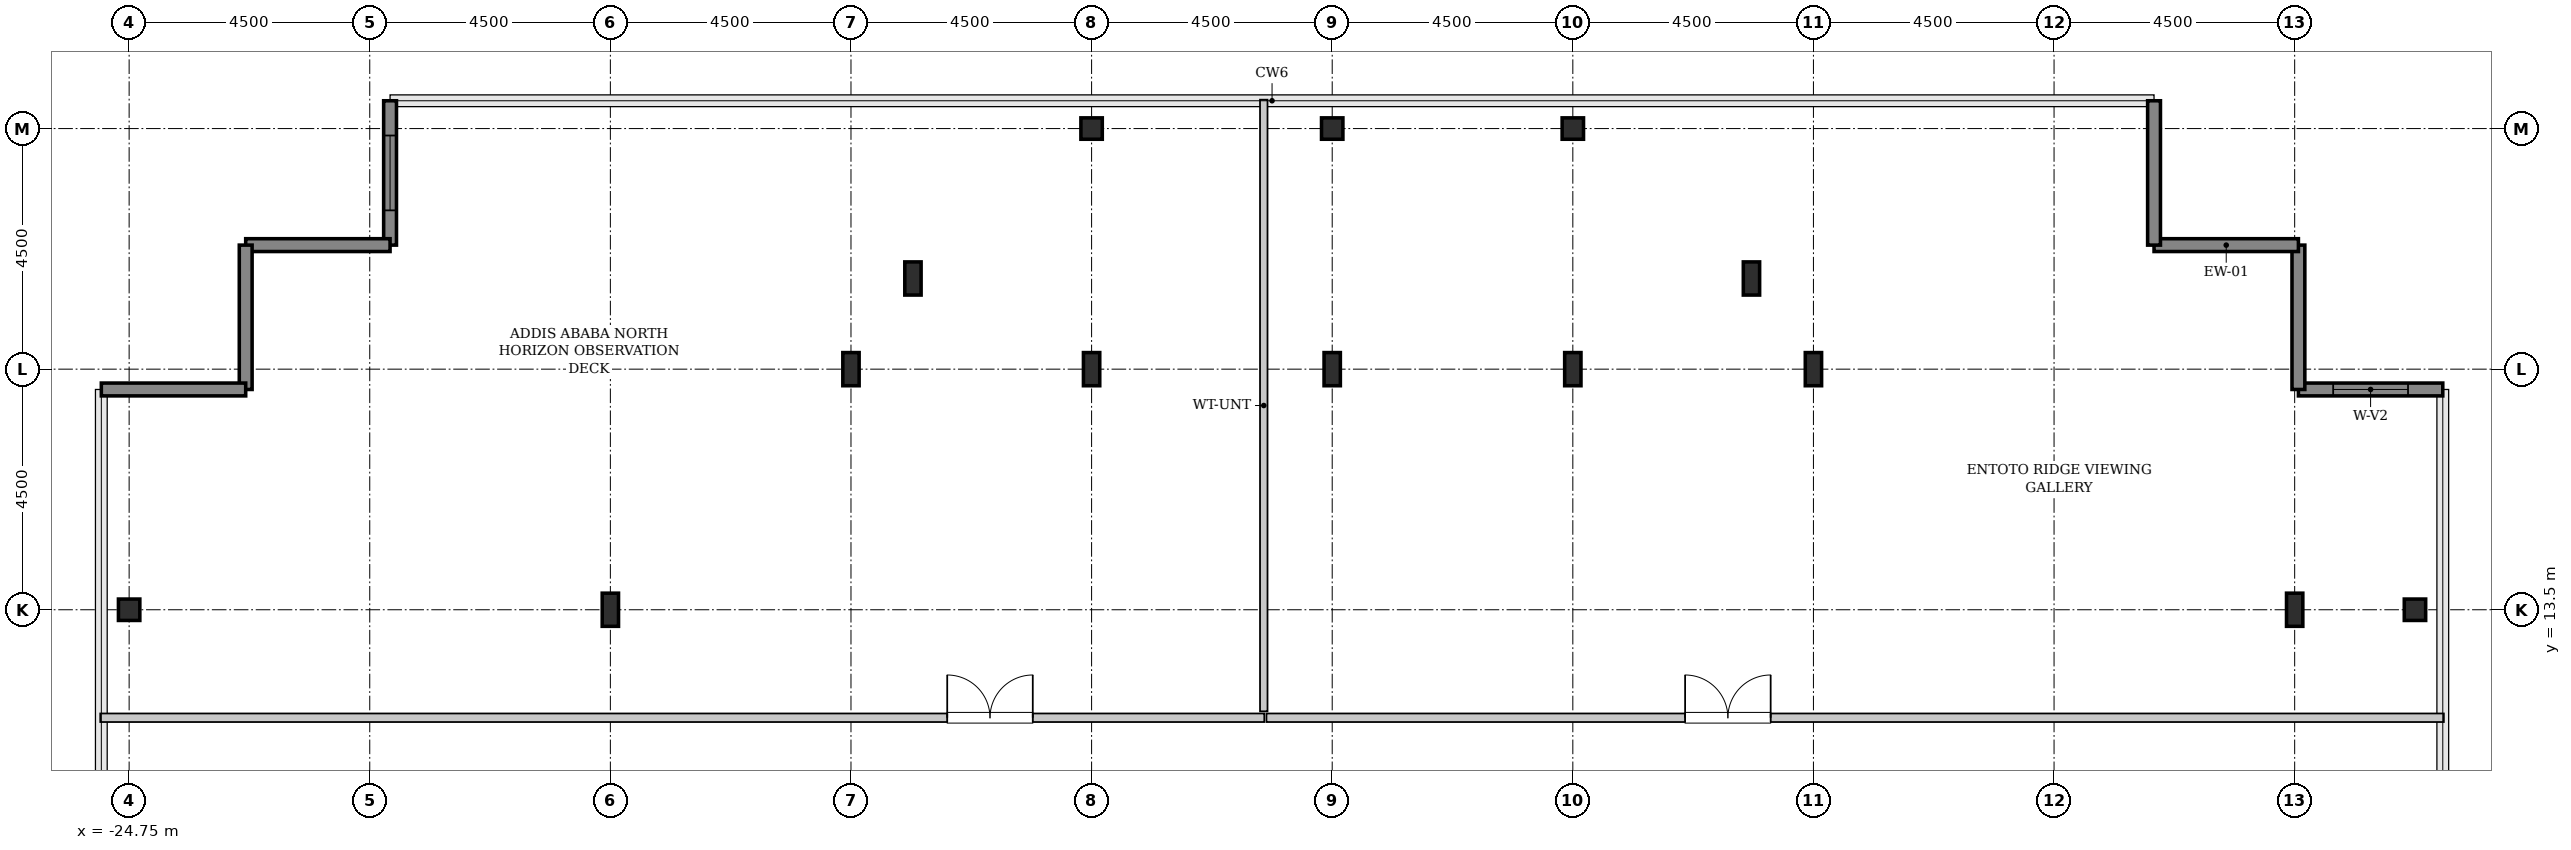
"""IFC4 building model, lengths in metres.
Left out: names, types, materials, properties, quantities, classifications, styles, units other than length and angle.
Written with IfcOpenShell. Run it as: python <this file> out.ifc"""

import sys

from ifc_helpers import new_model, si_unit, direction, frame, frame_2d, origin, origin_2d, place, context, subcontext, project, spatial, rectangle, hollow_rectangle, i_section, extrude, source, transform, mapped, element, fill, save


model = new_model("IFC4")
c1 = context("Model", 3, precision=1e-05, world=origin(), true_north=direction((0.0, 1.0)))
c2 = subcontext(c1, "Body", "Model", "MODEL_VIEW")
j1 = project(units=[si_unit("LENGTHUNIT", "METRE"), si_unit("PLANEANGLEUNIT", "RADIAN")], contexts=[c1])
p1 = place(None, origin())
s1 = spatial("IfcSite", under=j1, at=p1, CompositionType="ELEMENT")
p2 = place(p1, origin())
s2 = spatial("IfcBuilding", under=s1, at=p2, CompositionType="ELEMENT")
p3 = place(p2, frame((0.0, 0.0, 349.0)))
s3 = spatial("IfcBuildingStorey", under=s2, at=p3, CompositionType="ELEMENT", Elevation=349.0)
m1 = source(origin(), c2, "Body", "SweptSolid", [
    extrude(hollow_rectangle(XDim=0.4, YDim=0.4, WallThickness=0.02, InnerFilletRadius=0.02, OuterFilletRadius=0.04, at=origin_2d()), origin(), (0.0, 0.0, 1.0), 4.8),
])
p4 = place(p3, frame((-24.75, 13.5, 0.0), z_axis=(0.0, 0.0, 1.0), x_axis=(1.0, 0.0, 0.0)))
e1 = element("IfcColumn", 1, at=p4, inside=s3, PredefinedType="COLUMN", context=c2, shape_type="MappedRepresentation", body=[
    mapped(m1, transform((0.0, 0.0, 0.0), x_axis=(1.0, 0.0, 0.0), y_axis=(0.0, 1.0, 0.0), z_axis=(0.0, 0.0, 1.0), scale=1.0)),
])
m2 = source(origin(), c2, "Body", "SweptSolid", [
    extrude(i_section(OverallWidth=0.305, OverallDepth=0.62, WebThickness=0.021, FlangeThickness=0.04, FilletRadius=0.027, at=origin_2d()), origin(), (0.0, 0.0, 1.0), 4.8),
])
for number, where, z_axis, x_axis in (
    (2, (-15.75, 13.5, 0.0), (0.0, 0.0, 1.0), (1.0, 0.0, 0.0)),
    (3, (-11.25, 18.0, 0.0), (0.0, 0.0, 1.0), (1.0, 0.0, 0.0)),
    (4, (-10.091, 19.696, 0.0), (0.0, 0.0, 1.0), (1.0, 0.0, 0.0)),
    (5, (-6.75, 18.0, 0.0), (0.0, 0.0, 1.0), (1.0, 0.0, 0.0)),
):
    element("IfcColumn", number, at=place(p3, frame(where, z_axis=z_axis, x_axis=x_axis)), inside=s3, PredefinedType="COLUMN", context=c2, shape_type="MappedRepresentation", body=[
        mapped(m2, transform((0.0, 0.0, 0.0), x_axis=(1.0, 0.0, 0.0), y_axis=(0.0, 1.0, 0.0), z_axis=(0.0, 0.0, 1.0), scale=1.0)),
    ])
p5 = place(p3, frame((-6.75, 22.5, 0.0), z_axis=(0.0, 0.0, 1.0), x_axis=(1.0, 0.0, 0.0)))
e6 = element("IfcColumn", 6, at=p5, inside=s3, PredefinedType="COLUMN", context=c2, shape_type="MappedRepresentation", body=[
    mapped(m1, transform((0.0, 0.0, 0.0), x_axis=(1.0, 0.0, 0.0), y_axis=(0.0, 1.0, 0.0), z_axis=(0.0, 0.0, 1.0), scale=1.0)),
])
p6 = place(p3, frame((-2.25, 18.0, 0.0), z_axis=(0.0, 0.0, 1.0), x_axis=(1.0, 0.0, 0.0)))
e7 = element("IfcColumn", 7, at=p6, inside=s3, PredefinedType="COLUMN", context=c2, shape_type="MappedRepresentation", body=[
    mapped(m2, transform((0.0, 0.0, 0.0), x_axis=(1.0, 0.0, 0.0), y_axis=(0.0, 1.0, 0.0), z_axis=(0.0, 0.0, 1.0), scale=1.0)),
])
p7 = place(p3, frame((-2.25, 22.5, 0.0), z_axis=(0.0, 0.0, 1.0), x_axis=(1.0, 0.0, 0.0)))
e8 = element("IfcColumn", 8, at=p7, inside=s3, PredefinedType="COLUMN", context=c2, shape_type="MappedRepresentation", body=[
    mapped(m1, transform((0.0, 0.0, 0.0), x_axis=(1.0, 0.0, 0.0), y_axis=(0.0, 1.0, 0.0), z_axis=(0.0, 0.0, 1.0), scale=1.0)),
])
p8 = place(p3, frame((2.25, 18.0, 0.0), z_axis=(0.0, 0.0, 1.0), x_axis=(1.0, 0.0, 0.0)))
e9 = element("IfcColumn", 9, at=p8, inside=s3, PredefinedType="COLUMN", context=c2, shape_type="MappedRepresentation", body=[
    mapped(m2, transform((0.0, 0.0, 0.0), x_axis=(1.0, 0.0, 0.0), y_axis=(0.0, 1.0, 0.0), z_axis=(0.0, 0.0, 1.0), scale=1.0)),
])
p9 = place(p3, frame((2.25, 22.5, 0.0), z_axis=(0.0, 0.0, 1.0), x_axis=(1.0, 0.0, 0.0)))
e10 = element("IfcColumn", 10, at=p9, inside=s3, PredefinedType="COLUMN", context=c2, shape_type="MappedRepresentation", body=[
    mapped(m1, transform((0.0, 0.0, 0.0), x_axis=(1.0, 0.0, 0.0), y_axis=(0.0, 1.0, 0.0), z_axis=(0.0, 0.0, 1.0), scale=1.0)),
])
for number, where, z_axis, x_axis in (
    (11, (5.591, 19.696, 0.0), (0.0, 0.0, 1.0), (1.0, 0.0, 0.0)),
    (12, (6.75, 18.0, 0.0), (0.0, 0.0, 1.0), (1.0, 0.0, 0.0)),
    (13, (15.75, 13.5, 0.0), (0.0, 0.0, 1.0), (1.0, 0.0, 0.0)),
):
    element("IfcColumn", number, at=place(p3, frame(where, z_axis=z_axis, x_axis=x_axis)), inside=s3, PredefinedType="COLUMN", context=c2, shape_type="MappedRepresentation", body=[
        mapped(m2, transform((0.0, 0.0, 0.0), x_axis=(1.0, 0.0, 0.0), y_axis=(0.0, 1.0, 0.0), z_axis=(0.0, 0.0, 1.0), scale=1.0)),
    ])
p10 = place(p3, frame((18.0, 13.5, 0.0), z_axis=(0.0, 0.0, 1.0), x_axis=(1.0, 0.0, 0.0)))
e14 = element("IfcColumn", 14, at=p10, inside=s3, PredefinedType="COLUMN", context=c2, shape_type="MappedRepresentation", body=[
    mapped(m1, transform((0.0, 0.0, 0.0), x_axis=(1.0, 0.0, 0.0), y_axis=(0.0, 1.0, 0.0), z_axis=(0.0, 0.0, 1.0), scale=1.0)),
])
m3 = source(origin(), c2, "Body", "SweptSolid", [
    extrude(rectangle(XDim=2.7, YDim=0.24, at=frame_2d((1.35, 0.0))), origin(), (0.0, 0.0, 1.0), 4.5),
])
p11 = place(p3, frame((18.52, 17.62, 0.0), z_axis=(0.0, 0.0, 1.0), x_axis=(-1.0, 0.0, 0.0)))
e15 = element("IfcWall", 15, at=p11, inside=s3, PredefinedType="SHEAR", context=c2, shape_type="MappedRepresentation", body=[
    mapped(m3, transform((0.0, 0.0, 0.0), x_axis=(1.0, 0.0, 0.0), y_axis=(0.0, 1.0, 0.0), z_axis=(0.0, 0.0, 1.0), scale=1.0)),
])
p12 = place(p11, frame((0.65, 0.0, 0.85)))
e16 = element("IfcOpeningElement", 16, at=p12, cuts=e15, PredefinedType="OPENING", context=c2, shape_type="SweptSolid", body=[
    extrude(rectangle(XDim=1.4, YDim=1.8, at=frame_2d((0.7, 0.9))), frame((0.0, 0.13, 0.0), z_axis=(0.0, -1.0, 0.0), x_axis=(1.0, 0.0, 0.0)), (0.0, 0.0, 1.0), 0.26),
])
for number, where, z_axis, x_axis in (
    (17, (15.82, 17.62, 0.0), (0.0, 0.0, 1.0), (0.0, 1.0, 0.0)),
    (18, (15.82, 20.32, 0.0), (0.0, 0.0, 1.0), (-1.0, 0.0, 0.0)),
    (19, (13.12, 20.32, 0.0), (0.0, 0.0, 1.0), (0.0, 1.0, 0.0)),
):
    element("IfcWall", number, at=place(p3, frame(where, z_axis=z_axis, x_axis=x_axis)), inside=s3, PredefinedType="SHEAR", context=c2, shape_type="MappedRepresentation", body=[
        mapped(m3, transform((0.0, 0.0, 0.0), x_axis=(1.0, 0.0, 0.0), y_axis=(0.0, 1.0, 0.0), z_axis=(0.0, 0.0, 1.0), scale=1.0)),
    ])
p13 = place(p3, frame((-19.87, 23.02, 0.0), z_axis=(0.0, 0.0, 1.0), x_axis=(0.0, -1.0, 0.0)))
e20 = element("IfcWall", 20, at=p13, inside=s3, PredefinedType="SHEAR", context=c2, shape_type="MappedRepresentation", body=[
    mapped(m3, transform((0.0, 0.0, 0.0), x_axis=(1.0, 0.0, 0.0), y_axis=(0.0, 1.0, 0.0), z_axis=(0.0, 0.0, 1.0), scale=1.0)),
])
p14 = place(p13, frame((0.65, 0.0, 0.85)))
e21 = element("IfcOpeningElement", 21, at=p14, cuts=e20, PredefinedType="OPENING", context=c2, shape_type="SweptSolid", body=[
    extrude(rectangle(XDim=1.4, YDim=1.8, at=frame_2d((0.7, 0.9))), frame((0.0, 0.13, 0.0), z_axis=(0.0, -1.0, 0.0), x_axis=(1.0, 0.0, 0.0)), (0.0, 0.0, 1.0), 0.26),
])
for number, where, z_axis, x_axis in (
    (22, (-19.87, 20.32, 0.0), (0.0, 0.0, 1.0), (-1.0, 0.0, 0.0)),
    (23, (-22.57, 20.32, 0.0), (0.0, 0.0, 1.0), (0.0, -1.0, 0.0)),
    (24, (-22.57, 17.62, 0.0), (0.0, 0.0, 1.0), (-1.0, 0.0, 0.0)),
):
    element("IfcWall", number, at=place(p3, frame(where, z_axis=z_axis, x_axis=x_axis)), inside=s3, PredefinedType="SHEAR", context=c2, shape_type="MappedRepresentation", body=[
        mapped(m3, transform((0.0, 0.0, 0.0), x_axis=(1.0, 0.0, 0.0), y_axis=(0.0, 1.0, 0.0), z_axis=(0.0, 0.0, 1.0), scale=1.0)),
    ])
m4 = source(origin(), c2, "Body", "SweptSolid", [
    extrude(rectangle(XDim=21.77, YDim=0.16, at=frame_2d((10.885, 0.0))), origin(), (0.0, 0.0, 1.0), 4.485),
])
p15 = place(p3, frame((-25.29, 11.48, 0.0), z_axis=(0.0, 0.0, 1.0), x_axis=(1.0, 0.0, 0.0)))
e25 = element("IfcWall", 25, at=p15, inside=s3, PredefinedType="PARTITIONING", context=c2, shape_type="MappedRepresentation", body=[
    mapped(m4, transform((0.0, 0.0, 0.0), x_axis=(1.0, 0.0, 0.0), y_axis=(0.0, 1.0, 0.0), z_axis=(0.0, 0.0, 1.0), scale=1.0)),
])
p16 = place(p15, frame((15.84, 0.0, 0.0)))
e26 = element("IfcOpeningElement", 26, at=p16, cuts=e25, PredefinedType="OPENING", context=c2, shape_type="SweptSolid", body=[
    extrude(rectangle(XDim=1.6, YDim=2.3, at=frame_2d((0.8, 1.15))), frame((0.0, 0.09, 0.0), z_axis=(0.0, -1.0, 0.0), x_axis=(1.0, 0.0, 0.0)), (0.0, 0.0, 1.0), 0.18),
])
m5 = source(origin(), c2, "Body", "SweptSolid", [
    extrude(rectangle(XDim=11.44, YDim=0.14, at=frame_2d((5.72, 0.0))), origin(), (0.0, 0.0, 1.0), 4.485),
])
p17 = place(p3, frame((-3.53, 11.6, 0.0), z_axis=(0.0, 0.0, 1.0), x_axis=(0.0, 1.0, 0.0)))
e27 = element("IfcWall", 27, at=p17, inside=s3, PredefinedType="PARTITIONING", context=c2, shape_type="MappedRepresentation", body=[
    mapped(m5, transform((0.0, 0.0, 0.0), x_axis=(1.0, 0.0, 0.0), y_axis=(0.0, 1.0, 0.0), z_axis=(0.0, 0.0, 1.0), scale=1.0)),
])
m6 = source(origin(), c2, "Body", "SweptSolid", [
    extrude(rectangle(XDim=22.02, YDim=0.16, at=frame_2d((11.01, 0.0))), origin(), (0.0, 0.0, 1.0), 4.485),
])
p18 = place(p3, frame((-3.48, 11.48, 0.0), z_axis=(0.0, 0.0, 1.0), x_axis=(1.0, 0.0, 0.0)))
e28 = element("IfcWall", 28, at=p18, inside=s3, PredefinedType="PARTITIONING", context=c2, shape_type="MappedRepresentation", body=[
    mapped(m6, transform((0.0, 0.0, 0.0), x_axis=(1.0, 0.0, 0.0), y_axis=(0.0, 1.0, 0.0), z_axis=(0.0, 0.0, 1.0), scale=1.0)),
])
p19 = place(p18, frame((7.83, 0.0, 0.0)))
e29 = element("IfcOpeningElement", 29, at=p19, cuts=e28, PredefinedType="OPENING", context=c2, shape_type="SweptSolid", body=[
    extrude(rectangle(XDim=1.6, YDim=2.3, at=frame_2d((0.8, 1.15))), frame((0.0, 0.09, 0.0), z_axis=(0.0, -1.0, 0.0), x_axis=(1.0, 0.0, 0.0)), (0.0, 0.0, 1.0), 0.18),
])
m7 = source(origin(), c2, "Body", "SweptSolid", [
    extrude(rectangle(XDim=1.4, YDim=1.8, at=frame_2d((0.7, 0.9))), frame((0.0, 0.03, 0.0), z_axis=(0.0, -1.0, 0.0), x_axis=(1.0, 0.0, 0.0)), (0.0, 0.0, 1.0), 0.06),
])
p20 = place(p12, origin())
e30 = element("IfcWindow", 30, at=p20, inside=s3, PartitioningType="SINGLE_PANEL", PredefinedType="WINDOW", context=c2, shape_type="MappedRepresentation", body=[
    mapped(m7, transform((0.0, 0.0, 0.0), x_axis=(1.0, 0.0, 0.0), y_axis=(0.0, 1.0, 0.0), z_axis=(0.0, 0.0, 1.0), scale=1.0)),
])
fill(e16, e30)
p21 = place(p14, origin())
e31 = element("IfcWindow", 31, at=p21, inside=s3, PartitioningType="SINGLE_PANEL", PredefinedType="WINDOW", context=c2, shape_type="MappedRepresentation", body=[
    mapped(m7, transform((0.0, 0.0, 0.0), x_axis=(1.0, 0.0, 0.0), y_axis=(0.0, 1.0, 0.0), z_axis=(0.0, 0.0, 1.0), scale=1.0)),
])
fill(e21, e31)
m8 = source(origin(), c2, "Body", "SweptSolid", [
    extrude(rectangle(XDim=1.6, YDim=2.3, at=frame_2d((0.8, 1.15))), frame((0.0, 0.025, 0.0), z_axis=(0.0, -1.0, 0.0), x_axis=(1.0, 0.0, 0.0)), (0.0, 0.0, 1.0), 0.05),
])
p22 = place(p16, origin())
e32 = element("IfcDoor", 32, at=p22, inside=s3, OperationType="DOUBLE_DOOR_SINGLE_SWING", PredefinedType="DOOR", context=c2, shape_type="MappedRepresentation", body=[
    mapped(m8, transform((0.0, 0.0, 0.0), x_axis=(1.0, 0.0, 0.0), y_axis=(0.0, 1.0, 0.0), z_axis=(0.0, 0.0, 1.0), scale=1.0)),
])
fill(e26, e32)
p23 = place(p19, origin())
e33 = element("IfcDoor", 33, at=p23, inside=s3, OperationType="DOUBLE_DOOR_SINGLE_SWING", PredefinedType="DOOR", context=c2, shape_type="MappedRepresentation", body=[
    mapped(m8, transform((0.0, 0.0, 0.0), x_axis=(1.0, 0.0, 0.0), y_axis=(0.0, 1.0, 0.0), z_axis=(0.0, 0.0, 1.0), scale=1.0)),
])
fill(e29, e33)
save(model, sys.argv[1])
